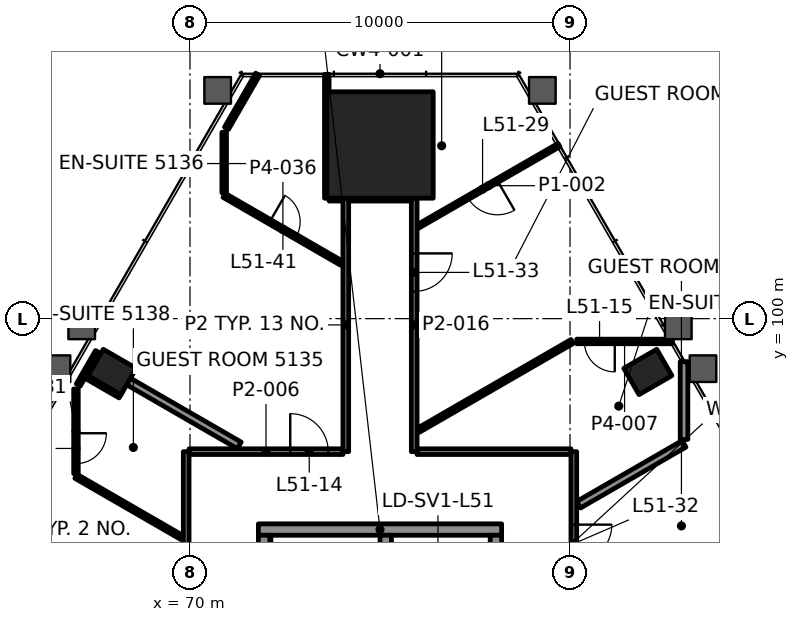
"""IFC4 building model, lengths in metres.
Left out: names, types, materials, properties, quantities, classifications, styles, units other than length and angle.
Written with IfcOpenShell. Run it as: python <this file> out.ifc"""

import sys

from ifc_helpers import new_model, si_unit, direction, frame, frame_2d, origin, origin_2d, place, context, subcontext, project, spatial, rectangle, hollow_rectangle, extrude, element, fill, save


model = new_model("IFC4")
c1 = context("Model", 3, precision=1e-05, world=origin(), true_north=direction((0.0, 1.0)))
c2 = subcontext(c1, "Body", "Model", "MODEL_VIEW")
j1 = project(units=[si_unit("LENGTHUNIT", "METRE"), si_unit("PLANEANGLEUNIT", "RADIAN")], contexts=[c1])
p1 = place(None, origin())
s1 = spatial("IfcSite", under=j1, at=p1, CompositionType="ELEMENT")
p2 = place(p1, origin())
s2 = spatial("IfcBuilding", under=s1, at=p2, CompositionType="ELEMENT")
p3 = place(p2, frame((0.0, 0.0, 218.2)))
s3 = spatial("IfcBuildingStorey", under=s2, at=p3, CompositionType="ELEMENT", Elevation=218.2)
p4 = place(p3, frame((75.0, 104.57, 0.0), z_axis=(0.0, 0.0, 1.0), x_axis=(-1.0, 0.0, 0.0)))
e1 = element("IfcColumn", 1, at=p4, inside=s3, PredefinedType="COLUMN", context=c2, shape_type="SweptSolid", body=[
    extrude(rectangle(XDim=2.8, YDim=2.8, at=origin_2d()), origin(), (0.0, 0.0, 1.0), 3.9),
])
for number, where, z_axis, x_axis in (
    (2, (82.048, 98.597, -0.0), (0.0, 0.0, 1.0), (-0.5, 0.866, 0.0)),
    (3, (67.952, 98.597, -0.0), (0.0, 0.0, 1.0), (-0.5, -0.866, 0.0)),
):
    element("IfcColumn", number, at=place(p3, frame(where, z_axis=z_axis, x_axis=x_axis)), inside=s3, PredefinedType="COLUMN", context=c2, shape_type="SweptSolid", body=[
        extrude(hollow_rectangle(XDim=0.8, YDim=1.0, WallThickness=0.05, at=origin_2d()), origin(), (0.0, 0.0, 1.0), 3.9),
    ])
p5 = place(p3, frame((71.8, 94.45, 0.0), z_axis=(0.0, 0.0, 1.0), x_axis=(1.0, 0.0, 0.0)))
e4 = element("IfcWall", 4, at=p5, inside=s3, PredefinedType="SHEAR", context=c2, shape_type="SweptSolid", body=[
    extrude(rectangle(XDim=6.4, YDim=0.3, at=frame_2d((3.2, 0.0))), origin(), (0.0, 0.0, 1.0), 3.7),
])
for number, where, z_axis, x_axis in (
    (5, (71.95, 88.1, 0.0), (0.0, 0.0, 1.0), (0.0, 1.0, 0.0)),
    (6, (78.05, 88.1, 0.0), (0.0, 0.0, 1.0), (0.0, 1.0, 0.0)),
):
    element("IfcWall", number, at=place(p3, frame(where, z_axis=z_axis, x_axis=x_axis)), inside=s3, PredefinedType="SHEAR", context=c2, shape_type="SweptSolid", body=[
        extrude(rectangle(XDim=6.2, YDim=0.3, at=frame_2d((3.1, 0.0))), origin(), (0.0, 0.0, 1.0), 3.7),
    ])
p6 = place(p3, frame((75.15, 88.1, 0.0), z_axis=(0.0, 0.0, 1.0), x_axis=(0.0, 1.0, 0.0)))
e7 = element("IfcWall", 7, at=p6, inside=s3, PredefinedType="SHEAR", context=c2, shape_type="SweptSolid", body=[
    extrude(rectangle(XDim=6.2, YDim=0.3, at=frame_2d((3.1, 0.0))), origin(), (0.0, 0.0, 1.0), 3.7),
])
p7 = place(p6, frame((0.185, 0.0, 0.0)))
e8 = element("IfcOpeningElement", 8, at=p7, cuts=e7, PredefinedType="OPENING", context=c2, shape_type="SweptSolid", body=[
    extrude(rectangle(XDim=1.0, YDim=2.1, at=frame_2d((0.5, 1.05))), frame((0.0, 0.16, 0.0), z_axis=(0.0, -1.0, 0.0), x_axis=(1.0, 0.0, 0.0)), (0.0, 0.0, 1.0), 0.32),
])
p8 = place(p3, frame((69.975, 96.5, 0.0), z_axis=(0.0, 0.0, 1.0), x_axis=(1.0, 0.0, 0.0)))
e9 = element("IfcWall", 9, at=p8, inside=s3, PredefinedType="PARTITIONING", context=c2, shape_type="SweptSolid", body=[
    extrude(rectangle(XDim=4.05, YDim=0.15, at=frame_2d((2.025, 0.0))), origin(), (0.0, 0.0, 1.0), 3.1),
])
p9 = place(p8, frame((2.663, 0.0, 0.0)))
e10 = element("IfcOpeningElement", 10, at=p9, cuts=e9, PredefinedType="OPENING", context=c2, shape_type="SweptSolid", body=[
    extrude(rectangle(XDim=1.0, YDim=2.1, at=frame_2d((0.5, 1.05))), frame((0.0, 0.085, 0.0), z_axis=(0.0, -1.0, 0.0), x_axis=(1.0, 0.0, 0.0)), (0.0, 0.0, 1.0), 0.17),
])
p10 = place(p3, frame((75.975, 96.5, 0.0), z_axis=(0.0, 0.0, 1.0), x_axis=(1.0, 0.0, 0.0)))
e11 = element("IfcWall", 11, at=p10, inside=s3, PredefinedType="PARTITIONING", context=c2, shape_type="SweptSolid", body=[
    extrude(rectangle(XDim=4.049, YDim=0.15, at=frame_2d((2.025, 0.0))), origin(), (0.0, 0.0, 1.0), 3.1),
])
p11 = place(p3, frame((82.693, 99.4, 0.0), z_axis=(0.0, 0.0, 1.0), x_axis=(-1.0, 0.0, 0.0)))
e12 = element("IfcWall", 12, at=p11, inside=s3, PredefinedType="PARTITIONING", context=c2, shape_type="SweptSolid", body=[
    extrude(rectangle(XDim=2.516, YDim=0.12, at=frame_2d((1.258, 0.0))), origin(), (0.0, 0.0, 1.0), 3.1),
])
p12 = place(p11, frame((1.516, 0.0, 0.0)))
e13 = element("IfcOpeningElement", 13, at=p12, cuts=e12, PredefinedType="OPENING", context=c2, shape_type="SweptSolid", body=[
    extrude(rectangle(XDim=0.8, YDim=2.1, at=frame_2d((0.4, 1.05))), frame((0.0, 0.07, 0.0), z_axis=(0.0, -1.0, 0.0), x_axis=(1.0, 0.0, 0.0)), (0.0, 0.0, 1.0), 0.14),
])
p13 = place(p3, frame((73.66, 103.17, 0.0), z_axis=(0.0, 0.0, 1.0), x_axis=(1.0, 0.0, 0.0)))
e14 = element("IfcWall", 14, at=p13, inside=s3, PredefinedType="PARTITIONING", context=c2, shape_type="SweptSolid", body=[
    extrude(rectangle(XDim=0.365, YDim=0.15, at=frame_2d((0.182, 0.0))), origin(), (0.0, 0.0, 1.0), 3.1),
])
p14 = place(p3, frame((80.227, 95.104, 0.0), z_axis=(0.0, 0.0, 1.0), x_axis=(0.866029421769, 0.499993040581, 0.0)))
e15 = element("IfcWall", 15, at=p14, inside=s3, PredefinedType="PARTITIONING", context=c2, shape_type="SweptSolid", body=[
    extrude(rectangle(XDim=3.202, YDim=0.2, at=frame_2d((1.601, 0.0))), origin(), (0.0, 0.0, 1.0), 3.022),
])
p15 = place(p3, frame((76.01, 97.063, 0.0), z_axis=(0.0, 0.0, 1.0), x_axis=(0.866045536992, 0.499965126639, 0.0)))
e16 = element("IfcWall", 16, at=p15, inside=s3, PredefinedType="PARTITIONING", context=c2, shape_type="SweptSolid", body=[
    extrude(rectangle(XDim=4.674, YDim=0.12, at=frame_2d((2.337, 0.0))), origin(), (0.0, 0.0, 1.0), 3.1),
])
p16 = place(p3, frame((79.709, 104.569, 0.0), z_axis=(0.0, 0.0, 1.0), x_axis=(-0.866020364144, -0.500008728811, 0.0)))
e17 = element("IfcWall", 17, at=p16, inside=s3, PredefinedType="PARTITIONING", context=c2, shape_type="SweptSolid", body=[
    extrude(rectangle(XDim=4.282, YDim=0.1, at=frame_2d((2.141, 0.0))), origin(), (0.0, 0.0, 1.0), 3.1),
])
p17 = place(p16, frame((1.871, 0.0, 0.0)))
e18 = element("IfcOpeningElement", 18, at=p17, cuts=e17, PredefinedType="OPENING", context=c2, shape_type="SweptSolid", body=[
    extrude(rectangle(XDim=0.9, YDim=2.1, at=frame_2d((0.45, 1.05))), frame((0.0, 0.06, 0.0), z_axis=(0.0, -1.0, 0.0), x_axis=(1.0, 0.0, 0.0)), (0.0, 0.0, 1.0), 0.12),
])
p18 = place(p3, frame((67.06, 98.253, 0.0), z_axis=(0.0, 0.0, 1.0), x_axis=(0.499972622635, 0.866041209536, 0.0)))
e19 = element("IfcWall", 19, at=p18, inside=s3, PredefinedType="PARTITIONING", context=c2, shape_type="SweptSolid", body=[
    extrude(rectangle(XDim=1.014, YDim=0.12, at=frame_2d((0.507, 0.0))), origin(), (0.0, 0.0, 1.0), 3.1),
])
p19 = place(p3, frame((70.96, 105.008, 0.0), z_axis=(0.0, 0.0, 1.0), x_axis=(0.500057100911, 0.865992434048, 0.0)))
e20 = element("IfcWall", 20, at=p19, inside=s3, PredefinedType="PARTITIONING", context=c2, shape_type="SweptSolid", body=[
    extrude(rectangle(XDim=1.642, YDim=0.12, at=frame_2d((0.821, 0.0))), origin(), (0.0, 0.0, 1.0), 3.1),
])
p20 = place(p3, frame((83.0, 96.821, 0.0), z_axis=(0.0, 0.0, 1.0), x_axis=(0.0, 1.0, 0.0)))
e21 = element("IfcWall", 21, at=p20, inside=s3, PredefinedType="PARTITIONING", context=c2, shape_type="SweptSolid", body=[
    extrude(rectangle(XDim=2.048, YDim=0.2, at=frame_2d((1.024, 0.0))), origin(), (0.0, 0.0, 1.0), 3.022),
])
p21 = place(p3, frame((80.1, 96.5, 0.0), z_axis=(0.0, 0.0, 1.0), x_axis=(0.0, -1.0, 0.0)))
e22 = element("IfcWall", 22, at=p21, inside=s3, PredefinedType="PARTITIONING", context=c2, shape_type="SweptSolid", body=[
    extrude(rectangle(XDim=10.6, YDim=0.15, at=frame_2d((5.3, 0.0))), origin(), (0.0, 0.0, 1.0), 3.097),
])
p22 = place(p21, frame((1.92, 0.0, 0.0)))
e23 = element("IfcOpeningElement", 23, at=p22, cuts=e22, PredefinedType="OPENING", context=c2, shape_type="SweptSolid", body=[
    extrude(rectangle(XDim=1.0, YDim=2.1, at=frame_2d((0.5, 1.05))), frame((0.0, 0.085, 0.0), z_axis=(0.0, -1.0, 0.0), x_axis=(1.0, 0.0, 0.0)), (0.0, 0.0, 1.0), 0.17),
])
p23 = place(p3, frame((75.9, 103.169, 0.0), z_axis=(0.0, 0.0, 1.0), x_axis=(0.0, -1.0, 0.0)))
e24 = element("IfcWall", 24, at=p23, inside=s3, PredefinedType="PARTITIONING", context=c2, shape_type="SweptSolid", body=[
    extrude(rectangle(XDim=6.669, YDim=0.15, at=frame_2d((3.334, 0.0))), origin(), (0.0, 0.0, 1.0), 3.1),
])
p24 = place(p23, frame((1.452, 0.0, 0.0)))
e25 = element("IfcOpeningElement", 25, at=p24, cuts=e24, PredefinedType="OPENING", context=c2, shape_type="SweptSolid", body=[
    extrude(rectangle(XDim=1.0, YDim=2.1, at=frame_2d((0.5, 1.05))), frame((0.0, 0.085, 0.0), z_axis=(0.0, -1.0, 0.0), x_axis=(1.0, 0.0, 0.0)), (0.0, 0.0, 1.0), 0.17),
])
p25 = place(p3, frame((74.1, 96.5, 0.0), z_axis=(0.0, 0.0, 1.0), x_axis=(0.0, 1.0, 0.0)))
e26 = element("IfcWall", 26, at=p25, inside=s3, PredefinedType="PARTITIONING", context=c2, shape_type="SweptSolid", body=[
    extrude(rectangle(XDim=6.67, YDim=0.15, at=frame_2d((3.335, 0.0))), origin(), (0.0, 0.0, 1.0), 3.1),
])
p26 = place(p3, frame((73.6, 103.17, 0.0), z_axis=(0.0, 0.0, 1.0), x_axis=(0.0, 1.0, 0.0)))
e27 = element("IfcWall", 27, at=p26, inside=s3, PredefinedType="PARTITIONING", context=c2, shape_type="SweptSolid", body=[
    extrude(rectangle(XDim=3.26, YDim=0.12, at=frame_2d((1.63, 0.0))), origin(), (0.0, 0.0, 1.0), 3.1),
])
p27 = place(p3, frame((70.9, 103.312, 0.0), z_axis=(0.0, 0.0, 1.0), x_axis=(0.0, 1.0, 0.0)))
e28 = element("IfcWall", 28, at=p27, inside=s3, PredefinedType="PARTITIONING", context=c2, shape_type="SweptSolid", body=[
    extrude(rectangle(XDim=1.592, YDim=0.12, at=frame_2d((0.796, 0.0))), origin(), (0.0, 0.0, 1.0), 3.1),
])
p28 = place(p3, frame((69.9, 85.9, 0.0), z_axis=(0.0, 0.0, 1.0), x_axis=(0.0, 1.0, 0.0)))
e29 = element("IfcWall", 29, at=p28, inside=s3, PredefinedType="PARTITIONING", context=c2, shape_type="SweptSolid", body=[
    extrude(rectangle(XDim=10.6, YDim=0.15, at=frame_2d((5.3, 0.0))), origin(), (0.0, 0.0, 1.0), 3.097),
])
p29 = place(p28, frame((1.968, 0.0, 0.0)))
e30 = element("IfcOpeningElement", 30, at=p29, cuts=e29, PredefinedType="OPENING", context=c2, shape_type="SweptSolid", body=[
    extrude(rectangle(XDim=0.9, YDim=2.1, at=frame_2d((0.45, 1.05))), frame((0.0, 0.085, 0.0), z_axis=(0.0, -1.0, 0.0), x_axis=(1.0, 0.0, 0.0)), (0.0, 0.0, 1.0), 0.17),
])
p30 = place(p28, frame((6.825, 0.0, 0.0)))
e31 = element("IfcOpeningElement", 31, at=p30, cuts=e29, PredefinedType="OPENING", context=c2, shape_type="SweptSolid", body=[
    extrude(rectangle(XDim=1.0, YDim=2.1, at=frame_2d((0.5, 1.05))), frame((0.0, 0.085, 0.0), z_axis=(0.0, -1.0, 0.0), x_axis=(1.0, 0.0, 0.0)), (0.0, 0.0, 1.0), 0.17),
])
p31 = place(p3, frame((67.0, 98.149, 0.0), z_axis=(0.0, 0.0, 1.0), x_axis=(0.0, -1.0, 0.0)))
e32 = element("IfcWall", 32, at=p31, inside=s3, PredefinedType="PARTITIONING", context=c2, shape_type="SweptSolid", body=[
    extrude(rectangle(XDim=2.228, YDim=0.12, at=frame_2d((1.114, 0.0))), origin(), (0.0, 0.0, 1.0), 3.022),
])
p32 = place(p31, frame((1.164, 0.0, 0.0)))
e33 = element("IfcOpeningElement", 33, at=p32, cuts=e32, PredefinedType="OPENING", context=c2, shape_type="SweptSolid", body=[
    extrude(rectangle(XDim=0.8, YDim=2.1, at=frame_2d((0.4, 1.05))), frame((0.0, 0.07, 0.0), z_axis=(0.0, -1.0, 0.0), x_axis=(1.0, 0.0, 0.0)), (0.0, 0.0, 1.0), 0.14),
])
p33 = place(p3, frame((70.9, 103.243, 0.0), z_axis=(0.0, 0.0, 1.0), x_axis=(0.866028357664, -0.499994883695, 0.0)))
e34 = element("IfcWall", 34, at=p33, inside=s3, PredefinedType="PARTITIONING", context=c2, shape_type="SweptSolid", body=[
    extrude(rectangle(XDim=3.568, YDim=0.12, at=frame_2d((1.784, 0.0))), origin(), (0.0, 0.0, 1.0), 3.1),
])
p34 = place(p33, frame((1.384, 0.0, 0.0)))
e35 = element("IfcOpeningElement", 35, at=p34, cuts=e34, PredefinedType="OPENING", context=c2, shape_type="SweptSolid", body=[
    extrude(rectangle(XDim=0.8, YDim=2.1, at=frame_2d((0.4, 1.05))), frame((0.0, 0.07, 0.0), z_axis=(0.0, -1.0, 0.0), x_axis=(1.0, 0.0, 0.0)), (0.0, 0.0, 1.0), 0.14),
])
p35 = place(p3, frame((71.298, 96.665, 0.0), z_axis=(0.0, 0.0, 1.0), x_axis=(-0.866023625329, 0.500003080363, 0.0)))
e36 = element("IfcWall", 36, at=p35, inside=s3, PredefinedType="PARTITIONING", context=c2, shape_type="SweptSolid", body=[
    extrude(rectangle(XDim=3.364, YDim=0.2, at=frame_2d((1.682, 0.0))), origin(), (0.0, 0.0, 1.0), 3.1),
])
p36 = place(p3, frame((68.185, 98.0, 0.0), z_axis=(0.0, 0.0, 1.0), x_axis=(-0.866071776036, 0.499919672301, 0.0)))
e37 = element("IfcWall", 37, at=p36, inside=s3, PredefinedType="PARTITIONING", context=c2, shape_type="SweptSolid", body=[
    extrude(rectangle(XDim=1.0, YDim=0.2, at=frame_2d((0.5, 0.0))), origin(), (0.0, 0.0, 1.0), 3.022),
])
p37 = place(p3, frame((69.79, 94.24, 0.0), z_axis=(0.0, 0.0, 1.0), x_axis=(-0.86604299788, 0.499969524894, 0.0)))
e38 = element("IfcWall", 38, at=p37, inside=s3, PredefinedType="PARTITIONING", context=c2, shape_type="SweptSolid", body=[
    extrude(rectangle(XDim=3.222, YDim=0.12, at=frame_2d((1.611, 0.0))), origin(), (0.0, 0.0, 1.0), 3.1),
])
p38 = place(p3, frame((74.175, 103.17, 0.0), z_axis=(0.0, 0.0, 1.0), x_axis=(1.0, 0.0, 0.0)))
e39 = element("IfcWall", 39, at=p38, inside=s3, PredefinedType="PARTITIONING", context=c2, shape_type="SweptSolid", body=[
    extrude(rectangle(XDim=1.649, YDim=0.15, at=frame_2d((0.825, 0.0))), origin(), (0.0, 0.0, 1.0), 3.097),
])
p39 = place(p9, origin())
e40 = element("IfcDoor", 40, at=p39, inside=s3, OperationType="SINGLE_SWING_RIGHT", PredefinedType="DOOR", context=c2, shape_type="SweptSolid", body=[
    extrude(rectangle(XDim=1.0, YDim=2.1, at=frame_2d((0.5, 1.05))), frame((0.0, 0.025, 0.0), z_axis=(0.0, -1.0, 0.0), x_axis=(1.0, 0.0, 0.0)), (0.0, 0.0, 1.0), 0.05),
])
fill(e10, e40)
p40 = place(p12, origin())
e41 = element("IfcDoor", 41, at=p40, inside=s3, OperationType="SINGLE_SWING_LEFT", PredefinedType="DOOR", context=c2, shape_type="SweptSolid", body=[
    extrude(rectangle(XDim=0.8, YDim=2.1, at=frame_2d((0.4, 1.05))), frame((0.0, 0.025, 0.0), z_axis=(0.0, -1.0, 0.0), x_axis=(1.0, 0.0, 0.0)), (0.0, 0.0, 1.0), 0.05),
])
fill(e13, e41)
p41 = place(p17, origin())
e42 = element("IfcDoor", 42, at=p41, inside=s3, OperationType="SINGLE_SWING_RIGHT", PredefinedType="DOOR", context=c2, shape_type="SweptSolid", body=[
    extrude(rectangle(XDim=0.9, YDim=2.1, at=frame_2d((0.45, 1.05))), frame((0.0, 0.025, 0.0), z_axis=(0.0, -1.0, 0.0), x_axis=(1.0, 0.0, 0.0)), (0.0, 0.0, 1.0), 0.05),
])
fill(e18, e42)
p42 = place(p22, origin())
e43 = element("IfcDoor", 43, at=p42, inside=s3, OperationType="SINGLE_SWING_RIGHT", PredefinedType="DOOR", context=c2, shape_type="SweptSolid", body=[
    extrude(rectangle(XDim=1.0, YDim=2.1, at=frame_2d((0.5, 1.05))), frame((0.0, 0.025, 0.0), z_axis=(0.0, -1.0, 0.0), x_axis=(1.0, 0.0, 0.0)), (0.0, 0.0, 1.0), 0.05),
])
fill(e23, e43)
p43 = place(p24, origin())
e44 = element("IfcDoor", 44, at=p43, inside=s3, OperationType="SINGLE_SWING_RIGHT", PredefinedType="DOOR", context=c2, shape_type="SweptSolid", body=[
    extrude(rectangle(XDim=1.0, YDim=2.1, at=frame_2d((0.5, 1.05))), frame((0.0, 0.025, 0.0), z_axis=(0.0, -1.0, 0.0), x_axis=(1.0, 0.0, 0.0)), (0.0, 0.0, 1.0), 0.05),
])
fill(e25, e44)
p44 = place(p32, origin())
e45 = element("IfcDoor", 45, at=p44, inside=s3, OperationType="SINGLE_SWING_RIGHT", PredefinedType="DOOR", context=c2, shape_type="SweptSolid", body=[
    extrude(rectangle(XDim=0.8, YDim=2.1, at=frame_2d((0.4, 1.05))), frame((0.0, 0.025, 0.0), z_axis=(0.0, -1.0, 0.0), x_axis=(1.0, 0.0, 0.0)), (0.0, 0.0, 1.0), 0.05),
])
fill(e33, e45)
p45 = place(p34, origin())
e46 = element("IfcDoor", 46, at=p45, inside=s3, OperationType="SINGLE_SWING_RIGHT", PredefinedType="DOOR", context=c2, shape_type="SweptSolid", body=[
    extrude(rectangle(XDim=0.8, YDim=2.1, at=frame_2d((0.4, 1.05))), frame((0.0, 0.025, 0.0), z_axis=(0.0, -1.0, 0.0), x_axis=(1.0, 0.0, 0.0)), (0.0, 0.0, 1.0), 0.05),
])
fill(e35, e46)
p46 = place(p3, origin())
p47 = place(p46, frame((69.925, 103.965, 0.15), z_axis=(0.0, 0.0, 1.0), x_axis=(-0.5, -0.866025, 0.0)))
p48 = place(p47, origin())
e47 = element("IfcWindow", 47, at=p48, inside=s3, PartitioningType="SINGLE_PANEL", PredefinedType="WINDOW", context=c2, shape_type="SweptSolid", body=[
    extrude(rectangle(XDim=2.743, YDim=3.55, at=frame_2d((1.372, 1.775))), frame((0.0, 0.03, 0.0), z_axis=(0.0, -1.0, 0.0), x_axis=(1.0, 0.0, 0.0)), (0.0, 0.0, 1.0), 0.06),
])
save(model, sys.argv[1])
